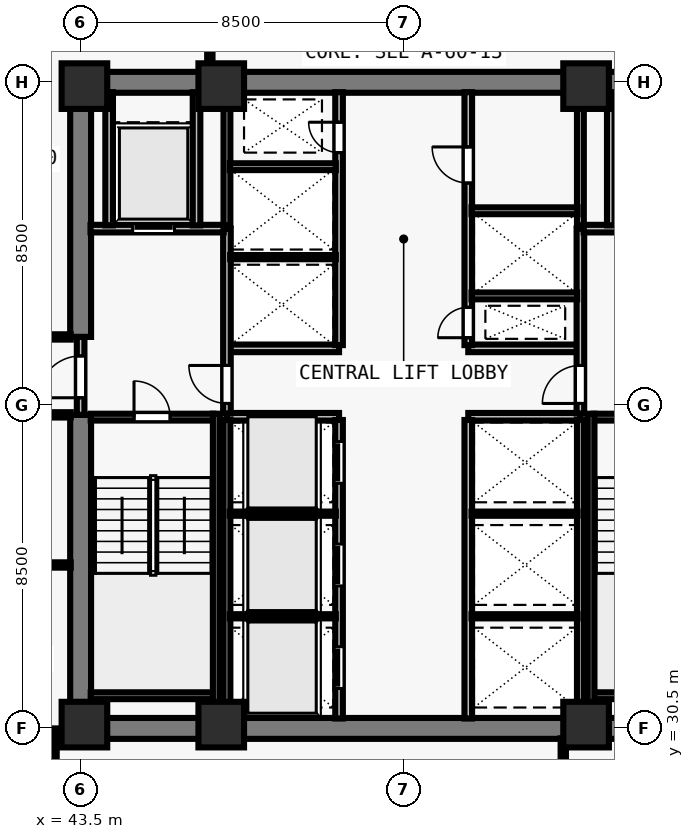
"""IFC4 building model, lengths in metres.
Left out: names, types, materials, properties, quantities, classifications, styles, units other than length and angle.
Written with IfcOpenShell. Run it as: python <this file> out.ifc"""

import sys

from ifc_helpers import new_model, si_unit, direction, frame, frame_2d, origin, origin_2d, place, context, subcontext, project, spatial, rectangle, extrude, element, fill, save


model = new_model("IFC4")
c1 = context("Model", 3, precision=1e-05, world=origin(), true_north=direction((0.0, 1.0)))
c2 = subcontext(c1, "Body", "Model", "MODEL_VIEW")
j1 = project(units=[si_unit("LENGTHUNIT", "METRE"), si_unit("PLANEANGLEUNIT", "RADIAN")], contexts=[c1])
p1 = place(None, origin())
s1 = spatial("IfcSite", under=j1, at=p1, CompositionType="ELEMENT")
p2 = place(p1, origin())
s2 = spatial("IfcBuilding", under=s1, at=p2, CompositionType="ELEMENT")
p3 = place(p2, frame((0.0, 0.0, 41.0)))
s3 = spatial("IfcBuildingStorey", under=s2, at=p3, CompositionType="ELEMENT", Elevation=41.0)
for number, where, z_axis, x_axis in (
    (1, (43.6, 30.6, 0.0), (0.0, 0.0, 1.0), (1.0, 0.0, 0.0)),
    (2, (47.2, 30.6, 0.0), (0.0, 0.0, 1.0), (1.0, 0.0, 0.0)),
    (3, (56.8, 30.6, 0.0), (0.0, 0.0, 1.0), (1.0, 0.0, 0.0)),
    (4, (43.6, 47.4, 0.0), (0.0, 0.0, 1.0), (1.0, 0.0, 0.0)),
    (5, (47.2, 47.4, 0.0), (0.0, 0.0, 1.0), (1.0, 0.0, 0.0)),
    (6, (56.8, 47.4, 0.0), (0.0, 0.0, 1.0), (1.0, 0.0, 0.0)),
):
    element("IfcColumn", number, at=place(p3, frame(where, z_axis=z_axis, x_axis=x_axis)), inside=s3, PredefinedType="COLUMN", context=c2, shape_type="SweptSolid", body=[
        extrude(rectangle(XDim=1.2, YDim=1.2, at=origin_2d()), origin(), (0.0, 0.0, 1.0), 3.5),
    ])
for number, where, z_axis, x_axis in (
    (7, (43.225, 30.5, 0.0), (0.0, 0.0, 1.0), (1.0, 0.0, 0.0)),
    (8, (43.225, 47.5, 0.0), (0.0, 0.0, 1.0), (1.0, 0.0, 0.0)),
):
    element("IfcWall", number, at=place(p3, frame(where, z_axis=z_axis, x_axis=x_axis)), inside=s3, PredefinedType="SHEAR", context=c2, shape_type="SweptSolid", body=[
        extrude(rectangle(XDim=17.55, YDim=0.55, at=frame_2d((8.775, 0.0))), origin(), (0.0, 0.0, 1.0), 3.28),
    ])
p4 = place(p3, frame((43.5, 30.765, 0.0), z_axis=(0.0, 0.0, 1.0), x_axis=(0.0, 1.0, 0.0)))
e9 = element("IfcWall", 9, at=p4, inside=s3, PredefinedType="SHEAR", context=c2, shape_type="SweptSolid", body=[
    extrude(rectangle(XDim=7.985, YDim=0.55, at=frame_2d((3.993, 0.0))), origin(), (0.0, 0.0, 1.0), 3.28),
])
p5 = place(p3, frame((43.5, 40.8, 0.0), z_axis=(0.0, 0.0, 1.0), x_axis=(0.0, 1.0, 0.0)))
e10 = element("IfcWall", 10, at=p5, inside=s3, PredefinedType="SHEAR", context=c2, shape_type="SweptSolid", body=[
    extrude(rectangle(XDim=6.435, YDim=0.55, at=frame_2d((3.218, 0.0))), origin(), (0.0, 0.0, 1.0), 3.28),
])
for number, where, z_axis, x_axis in (
    (11, (47.35, 38.7, 0.0), (0.0, 0.0, 1.0), (1.0, 0.0, 0.0)),
    (12, (47.35, 40.5, 0.0), (0.0, 0.0, 1.0), (1.0, 0.0, 0.0)),
    (13, (53.7, 38.7, 0.0), (0.0, 0.0, 1.0), (1.0, 0.0, 0.0)),
    (14, (53.7, 40.5, 0.0), (0.0, 0.0, 1.0), (1.0, 0.0, 0.0)),
):
    element("IfcWall", number, at=place(p3, frame(where, z_axis=z_axis, x_axis=x_axis)), inside=s3, PredefinedType="SOLIDWALL", context=c2, shape_type="SweptSolid", body=[
        extrude(rectangle(XDim=2.95, YDim=0.2, at=frame_2d((1.475, 0.0))), origin(), (0.0, 0.0, 1.0), 3.28),
    ])
p6 = place(p3, frame((50.3, 30.76, 0.0), z_axis=(0.0, 0.0, 1.0), x_axis=(0.0, 1.0, 0.0)))
e15 = element("IfcWall", 15, at=p6, inside=s3, PredefinedType="SOLIDWALL", context=c2, shape_type="SweptSolid", body=[
    extrude(rectangle(XDim=7.855, YDim=0.2, at=frame_2d((3.927, 0.0))), origin(), (0.0, 0.0, 1.0), 3.28),
])
p7 = place(p6, frame((0.79, 0.0, 0.0)))
e16 = element("IfcOpeningElement", 16, at=p7, cuts=e15, PredefinedType="OPENING", context=c2, shape_type="SweptSolid", body=[
    extrude(rectangle(XDim=1.1, YDim=2.2, at=frame_2d((0.55, 1.1))), frame((0.0, 0.11, 0.0), z_axis=(0.0, -1.0, 0.0), x_axis=(1.0, 0.0, 0.0)), (0.0, 0.0, 1.0), 0.22),
])
p8 = place(p6, frame((3.49, 0.0, 0.0)))
e17 = element("IfcOpeningElement", 17, at=p8, cuts=e15, PredefinedType="OPENING", context=c2, shape_type="SweptSolid", body=[
    extrude(rectangle(XDim=1.1, YDim=2.2, at=frame_2d((0.55, 1.1))), frame((0.0, 0.11, 0.0), z_axis=(0.0, -1.0, 0.0), x_axis=(1.0, 0.0, 0.0)), (0.0, 0.0, 1.0), 0.22),
])
p9 = place(p6, frame((6.19, 0.0, 0.0)))
e18 = element("IfcOpeningElement", 18, at=p9, cuts=e15, PredefinedType="OPENING", context=c2, shape_type="SweptSolid", body=[
    extrude(rectangle(XDim=1.1, YDim=2.2, at=frame_2d((0.55, 1.1))), frame((0.0, 0.11, 0.0), z_axis=(0.0, -1.0, 0.0), x_axis=(1.0, 0.0, 0.0)), (0.0, 0.0, 1.0), 0.22),
])
p10 = place(p3, frame((53.7, 30.76, 0.0), z_axis=(0.0, 0.0, 1.0), x_axis=(0.0, 1.0, 0.0)))
e19 = element("IfcWall", 19, at=p10, inside=s3, PredefinedType="SOLIDWALL", context=c2, shape_type="SweptSolid", body=[
    extrude(rectangle(XDim=7.855, YDim=0.2, at=frame_2d((3.927, 0.0))), origin(), (0.0, 0.0, 1.0), 3.28),
])
p11 = place(p3, frame((50.3, 40.585, 0.0), z_axis=(0.0, 0.0, 1.0), x_axis=(0.0, 1.0, 0.0)))
e20 = element("IfcWall", 20, at=p11, inside=s3, PredefinedType="SOLIDWALL", context=c2, shape_type="SweptSolid", body=[
    extrude(rectangle(XDim=6.655, YDim=0.2, at=frame_2d((3.328, 0.0))), origin(), (0.0, 0.0, 1.0), 3.28),
])
p12 = place(p11, frame((5.065, 0.0, 0.0)))
e21 = element("IfcOpeningElement", 21, at=p12, cuts=e20, PredefinedType="OPENING", context=c2, shape_type="SweptSolid", body=[
    extrude(rectangle(XDim=0.8, YDim=2.08, at=frame_2d((0.4, 1.04))), frame((0.0, 0.11, 0.0), z_axis=(0.0, -1.0, 0.0), x_axis=(1.0, 0.0, 0.0)), (0.0, 0.0, 1.0), 0.22),
])
p13 = place(p3, frame((53.7, 40.585, 0.0), z_axis=(0.0, 0.0, 1.0), x_axis=(0.0, 1.0, 0.0)))
e22 = element("IfcWall", 22, at=p13, inside=s3, PredefinedType="SOLIDWALL", context=c2, shape_type="SweptSolid", body=[
    extrude(rectangle(XDim=6.655, YDim=0.2, at=frame_2d((3.328, 0.0))), origin(), (0.0, 0.0, 1.0), 3.28),
])
p14 = place(p13, frame((0.195, 0.0, 0.0)))
e23 = element("IfcOpeningElement", 23, at=p14, cuts=e22, PredefinedType="OPENING", context=c2, shape_type="SweptSolid", body=[
    extrude(rectangle(XDim=0.8, YDim=2.08, at=frame_2d((0.4, 1.04))), frame((0.0, 0.11, 0.0), z_axis=(0.0, -1.0, 0.0), x_axis=(1.0, 0.0, 0.0)), (0.0, 0.0, 1.0), 0.22),
])
p15 = place(p13, frame((4.265, 0.0, 0.0)))
e24 = element("IfcOpeningElement", 24, at=p15, cuts=e22, PredefinedType="OPENING", context=c2, shape_type="SweptSolid", body=[
    extrude(rectangle(XDim=0.95, YDim=2.12, at=frame_2d((0.475, 1.06))), frame((0.0, 0.11, 0.0), z_axis=(0.0, -1.0, 0.0), x_axis=(1.0, 0.0, 0.0)), (0.0, 0.0, 1.0), 0.22),
])
p16 = place(p3, frame((43.5, 38.75, 0.0), z_axis=(0.0, 0.0, 1.0), x_axis=(0.0, 1.0, 0.0)))
e25 = element("IfcWall", 25, at=p16, inside=s3, PredefinedType="SOLIDWALL", context=c2, shape_type="SweptSolid", body=[
    extrude(rectangle(XDim=2.05, YDim=0.2, at=frame_2d((1.025, 0.0))), origin(), (0.0, 0.0, 1.0), 3.28),
])
p17 = place(p16, frame((0.45, 0.0, 0.0)))
e26 = element("IfcOpeningElement", 26, at=p17, cuts=e25, PredefinedType="OPENING", context=c2, shape_type="SweptSolid", body=[
    extrude(rectangle(XDim=1.1, YDim=2.15, at=frame_2d((0.55, 1.075))), frame((0.0, 0.11, 0.0), z_axis=(0.0, -1.0, 0.0), x_axis=(1.0, 0.0, 0.0)), (0.0, 0.0, 1.0), 0.22),
])
p18 = place(p3, frame((47.35, 38.785, 0.0), z_axis=(0.0, 0.0, 1.0), x_axis=(0.0, 1.0, 0.0)))
e27 = element("IfcWall", 27, at=p18, inside=s3, PredefinedType="SOLIDWALL", context=c2, shape_type="SweptSolid", body=[
    extrude(rectangle(XDim=4.865, YDim=0.2, at=frame_2d((2.433, 0.0))), origin(), (0.0, 0.0, 1.0), 3.28),
])
p19 = place(p18, frame((0.265, 0.0, 0.0)))
e28 = element("IfcOpeningElement", 28, at=p19, cuts=e27, PredefinedType="OPENING", context=c2, shape_type="SweptSolid", body=[
    extrude(rectangle(XDim=1.0, YDim=2.15, at=frame_2d((0.5, 1.075))), frame((0.0, 0.11, 0.0), z_axis=(0.0, -1.0, 0.0), x_axis=(1.0, 0.0, 0.0)), (0.0, 0.0, 1.0), 0.22),
])
p20 = place(p3, frame((43.76, 43.65, 0.0), z_axis=(0.0, 0.0, 1.0), x_axis=(1.0, 0.0, 0.0)))
e29 = element("IfcWall", 29, at=p20, inside=s3, PredefinedType="SOLIDWALL", context=c2, shape_type="SweptSolid", body=[
    extrude(rectangle(XDim=3.505, YDim=0.2, at=frame_2d((1.752, 0.0))), origin(), (0.0, 0.0, 1.0), 3.28),
])
p21 = place(p20, frame((1.11, 0.0, 0.0)))
e30 = element("IfcOpeningElement", 30, at=p21, cuts=e29, PredefinedType="OPENING", context=c2, shape_type="SweptSolid", body=[
    extrude(rectangle(XDim=1.1, YDim=2.2, at=frame_2d((0.55, 1.1))), frame((0.0, 0.11, 0.0), z_axis=(0.0, -1.0, 0.0), x_axis=(1.0, 0.0, 0.0)), (0.0, 0.0, 1.0), 0.22),
])
for number, where, z_axis, x_axis in (
    (31, (46.55, 43.735, 0.0), (0.0, 0.0, 1.0), (0.0, 1.0, 0.0)),
    (32, (44.25, 43.735, 0.0), (0.0, 0.0, 1.0), (0.0, 1.0, 0.0)),
):
    element("IfcWall", number, at=place(p3, frame(where, z_axis=z_axis, x_axis=x_axis)), inside=s3, PredefinedType="SOLIDWALL", context=c2, shape_type="SweptSolid", body=[
        extrude(rectangle(XDim=3.505, YDim=0.2, at=frame_2d((1.752, 0.0))), origin(), (0.0, 0.0, 1.0), 3.28),
    ])
p22 = place(p3, frame((56.65, 38.785, 0.0), z_axis=(0.0, 0.0, 1.0), x_axis=(0.0, 1.0, 0.0)))
e33 = element("IfcWall", 33, at=p22, inside=s3, PredefinedType="SOLIDWALL", context=c2, shape_type="SweptSolid", body=[
    extrude(rectangle(XDim=4.865, YDim=0.2, at=frame_2d((2.433, 0.0))), origin(), (0.0, 0.0, 1.0), 3.28),
])
p23 = place(p22, frame((0.265, 0.0, 0.0)))
e34 = element("IfcOpeningElement", 34, at=p23, cuts=e33, PredefinedType="OPENING", context=c2, shape_type="SweptSolid", body=[
    extrude(rectangle(XDim=1.0, YDim=2.15, at=frame_2d((0.5, 1.075))), frame((0.0, 0.11, 0.0), z_axis=(0.0, -1.0, 0.0), x_axis=(1.0, 0.0, 0.0)), (0.0, 0.0, 1.0), 0.22),
])
p24 = place(p3, frame((56.735, 43.65, 0.0), z_axis=(0.0, 0.0, 1.0), x_axis=(1.0, 0.0, 0.0)))
e35 = element("IfcWall", 35, at=p24, inside=s3, PredefinedType="SOLIDWALL", context=c2, shape_type="SweptSolid", body=[
    extrude(rectangle(XDim=3.505, YDim=0.2, at=frame_2d((1.752, 0.0))), origin(), (0.0, 0.0, 1.0), 3.28),
])
p25 = place(p24, frame((1.295, 0.0, 0.0)))
e36 = element("IfcOpeningElement", 36, at=p25, cuts=e35, PredefinedType="OPENING", context=c2, shape_type="SweptSolid", body=[
    extrude(rectangle(XDim=1.1, YDim=2.2, at=frame_2d((0.55, 1.1))), frame((0.0, 0.11, 0.0), z_axis=(0.0, -1.0, 0.0), x_axis=(1.0, 0.0, 0.0)), (0.0, 0.0, 1.0), 0.22),
])
p26 = place(p3, frame((57.45, 43.735, 0.0), z_axis=(0.0, 0.0, 1.0), x_axis=(0.0, 1.0, 0.0)))
e37 = element("IfcWall", 37, at=p26, inside=s3, PredefinedType="SOLIDWALL", context=c2, shape_type="SweptSolid", body=[
    extrude(rectangle(XDim=3.505, YDim=0.2, at=frame_2d((1.752, 0.0))), origin(), (0.0, 0.0, 1.0), 3.28),
])
p27 = place(p3, frame((47.35, 30.76, 0.0), z_axis=(0.0, 0.0, 1.0), x_axis=(0.0, 1.0, 0.0)))
e38 = element("IfcWall", 38, at=p27, inside=s3, PredefinedType="SOLIDWALL", context=c2, shape_type="SweptSolid", body=[
    extrude(rectangle(XDim=7.855, YDim=0.18, at=frame_2d((3.927, 0.0))), origin(), (0.0, 0.0, 1.0), 3.28),
])
for number, where, z_axis, x_axis in (
    (39, (47.425, 33.45, 0.0), (0.0, 0.0, 1.0), (1.0, 0.0, 0.0)),
    (40, (47.425, 36.15, 0.0), (0.0, 0.0, 1.0), (1.0, 0.0, 0.0)),
):
    element("IfcWall", number, at=place(p3, frame(where, z_axis=z_axis, x_axis=x_axis)), inside=s3, PredefinedType="PARTITIONING", context=c2, shape_type="SweptSolid", body=[
        extrude(rectangle(XDim=2.79, YDim=0.11, at=frame_2d((1.395, 0.0))), origin(), (0.0, 0.0, 1.0), 3.28),
    ])
p28 = place(p3, frame((56.65, 30.76, 0.0), z_axis=(0.0, 0.0, 1.0), x_axis=(0.0, 1.0, 0.0)))
e41 = element("IfcWall", 41, at=p28, inside=s3, PredefinedType="SOLIDWALL", context=c2, shape_type="SweptSolid", body=[
    extrude(rectangle(XDim=7.855, YDim=0.18, at=frame_2d((3.927, 0.0))), origin(), (0.0, 0.0, 1.0), 3.28),
])
for number, where, z_axis, x_axis in (
    (42, (53.785, 33.45, 0.0), (0.0, 0.0, 1.0), (1.0, 0.0, 0.0)),
    (43, (53.785, 36.15, 0.0), (0.0, 0.0, 1.0), (1.0, 0.0, 0.0)),
):
    element("IfcWall", number, at=place(p3, frame(where, z_axis=z_axis, x_axis=x_axis)), inside=s3, PredefinedType="PARTITIONING", context=c2, shape_type="SweptSolid", body=[
        extrude(rectangle(XDim=2.79, YDim=0.11, at=frame_2d((1.395, 0.0))), origin(), (0.0, 0.0, 1.0), 3.28),
    ])
p29 = place(p3, frame((47.35, 43.735, 0.0), z_axis=(0.0, 0.0, 1.0), x_axis=(0.0, 1.0, 0.0)))
e44 = element("IfcWall", 44, at=p29, inside=s3, PredefinedType="SOLIDWALL", context=c2, shape_type="SweptSolid", body=[
    extrude(rectangle(XDim=3.505, YDim=0.18, at=frame_2d((1.752, 0.0))), origin(), (0.0, 0.0, 1.0), 3.28),
])
p30 = place(p3, frame((47.435, 42.9, 0.0), z_axis=(0.0, 0.0, 1.0), x_axis=(1.0, 0.0, 0.0)))
e45 = element("IfcWall", 45, at=p30, inside=s3, PredefinedType="PARTITIONING", context=c2, shape_type="SweptSolid", body=[
    extrude(rectangle(XDim=2.78, YDim=0.11, at=frame_2d((1.39, 0.0))), origin(), (0.0, 0.0, 1.0), 3.28),
])
p31 = place(p3, frame((47.425, 45.28, 0.0), z_axis=(0.0, 0.0, 1.0), x_axis=(1.0, 0.0, 0.0)))
e46 = element("IfcWall", 46, at=p31, inside=s3, PredefinedType="SOLIDWALL", context=c2, shape_type="SweptSolid", body=[
    extrude(rectangle(XDim=2.79, YDim=0.18, at=frame_2d((1.395, 0.0))), origin(), (0.0, 0.0, 1.0), 3.28),
])
p32 = place(p3, frame((56.65, 43.735, 0.0), z_axis=(0.0, 0.0, 1.0), x_axis=(0.0, 1.0, 0.0)))
e47 = element("IfcWall", 47, at=p32, inside=s3, PredefinedType="SOLIDWALL", context=c2, shape_type="SweptSolid", body=[
    extrude(rectangle(XDim=3.505, YDim=0.18, at=frame_2d((1.752, 0.0))), origin(), (0.0, 0.0, 1.0), 3.28),
])
p33 = place(p3, frame((53.785, 41.88, 0.0), z_axis=(0.0, 0.0, 1.0), x_axis=(1.0, 0.0, 0.0)))
e48 = element("IfcWall", 48, at=p33, inside=s3, PredefinedType="SOLIDWALL", context=c2, shape_type="SweptSolid", body=[
    extrude(rectangle(XDim=2.78, YDim=0.18, at=frame_2d((1.39, 0.0))), origin(), (0.0, 0.0, 1.0), 3.28),
])
p34 = place(p3, frame((53.785, 44.12, 0.0), z_axis=(0.0, 0.0, 1.0), x_axis=(1.0, 0.0, 0.0)))
e49 = element("IfcWall", 49, at=p34, inside=s3, PredefinedType="SOLIDWALL", context=c2, shape_type="SweptSolid", body=[
    extrude(rectangle(XDim=2.79, YDim=0.18, at=frame_2d((1.395, 0.0))), origin(), (0.0, 0.0, 1.0), 3.28),
])
for number, where, z_axis, x_axis in (
    (50, (38.055, 38.75, 0.0), (0.0, 0.0, 1.0), (1.0, 0.0, 0.0)),
    (51, (38.055, 40.8, 0.0), (0.0, 0.0, 1.0), (1.0, 0.0, 0.0)),
):
    element("IfcWall", number, at=place(p3, frame(where, z_axis=z_axis, x_axis=x_axis)), inside=s3, PredefinedType="PARTITIONING", context=c2, shape_type="SweptSolid", body=[
        extrude(rectangle(XDim=5.185, YDim=0.14, at=frame_2d((2.593, 0.0))), origin(), (0.0, 0.0, 1.0), 3.28),
    ])
p35 = place(p3, frame((42.8, 24.605, 0.0), z_axis=(0.0, 0.0, 1.0), x_axis=(0.0, 1.0, 0.0)))
e52 = element("IfcWall", 52, at=p35, inside=s3, PredefinedType="PARTITIONING", context=c2, shape_type="SweptSolid", body=[
    extrude(rectangle(XDim=5.895, YDim=0.14, at=frame_2d((2.948, 0.0))), origin(), (0.0, 0.0, 1.0), 2.439),
])
p36 = place(p3, frame((56.2, 24.605, 0.0), z_axis=(0.0, 0.0, 1.0), x_axis=(0.0, 1.0, 0.0)))
e53 = element("IfcWall", 53, at=p36, inside=s3, PredefinedType="PARTITIONING", context=c2, shape_type="SweptSolid", body=[
    extrude(rectangle(XDim=5.635, YDim=0.14, at=frame_2d((2.817, 0.0))), origin(), (0.0, 0.0, 1.0), 2.849),
])
p37 = place(p3, frame((46.9, 47.76, 0.0), z_axis=(0.0, 0.0, 1.0), x_axis=(0.0, 1.0, 0.0)))
e54 = element("IfcWall", 54, at=p37, inside=s3, PredefinedType="PARTITIONING", context=c2, shape_type="SweptSolid", body=[
    extrude(rectangle(XDim=5.635, YDim=0.14, at=frame_2d((2.817, 0.0))), origin(), (0.0, 0.0, 1.0), 3.28),
])
p38 = place(p3, frame((38.055, 34.8, 0.0), z_axis=(0.0, 0.0, 1.0), x_axis=(1.0, 0.0, 0.0)))
e55 = element("IfcWall", 55, at=p38, inside=s3, PredefinedType="PARTITIONING", context=c2, shape_type="SweptSolid", body=[
    extrude(rectangle(XDim=5.185, YDim=0.14, at=frame_2d((2.593, 0.0))), origin(), (0.0, 0.0, 1.0), 3.28),
])
p39 = place(p3, frame((43.765, 38.69, 0.0), z_axis=(0.0, 0.0, 1.0), x_axis=(1.0, 0.0, 0.0)))
e56 = element("IfcWall", 56, at=p39, inside=s3, PredefinedType="SOLIDWALL", context=c2, shape_type="SweptSolid", body=[
    extrude(rectangle(XDim=3.23, YDim=0.18, at=frame_2d((1.615, 0.0))), origin(), (0.0, 0.0, 1.0), 3.28),
])
p40 = place(p39, frame((1.14, 0.0, 0.0)))
e57 = element("IfcOpeningElement", 57, at=p40, cuts=e56, PredefinedType="OPENING", context=c2, shape_type="SweptSolid", body=[
    extrude(rectangle(XDim=0.95, YDim=2.15, at=frame_2d((0.475, 1.075))), frame((0.0, 0.1, 0.0), z_axis=(0.0, -1.0, 0.0), x_axis=(1.0, 0.0, 0.0)), (0.0, 0.0, 1.0), 0.2),
])
p41 = place(p3, frame((43.765, 31.36, 0.0), z_axis=(0.0, 0.0, 1.0), x_axis=(1.0, 0.0, 0.0)))
e58 = element("IfcWall", 58, at=p41, inside=s3, PredefinedType="SOLIDWALL", context=c2, shape_type="SweptSolid", body=[
    extrude(rectangle(XDim=3.23, YDim=0.18, at=frame_2d((1.615, 0.0))), origin(), (0.0, 0.0, 1.0), 3.28),
])
p42 = place(p3, frame((47.07, 38.78, 0.0), z_axis=(0.0, 0.0, 1.0), x_axis=(0.0, -1.0, 0.0)))
e59 = element("IfcWall", 59, at=p42, inside=s3, PredefinedType="SOLIDWALL", context=c2, shape_type="SweptSolid", body=[
    extrude(rectangle(XDim=8.017, YDim=0.18, at=frame_2d((4.009, 0.0))), origin(), (0.0, 0.0, 1.0), 3.28),
])
p43 = place(p3, frame((57.005, 38.69, 0.0), z_axis=(0.0, 0.0, 1.0), x_axis=(1.0, 0.0, 0.0)))
e60 = element("IfcWall", 60, at=p43, inside=s3, PredefinedType="SOLIDWALL", context=c2, shape_type="SweptSolid", body=[
    extrude(rectangle(XDim=3.23, YDim=0.18, at=frame_2d((1.615, 0.0))), origin(), (0.0, 0.0, 1.0), 3.28),
])
p44 = place(p43, frame((1.14, 0.0, 0.0)))
e61 = element("IfcOpeningElement", 61, at=p44, cuts=e60, PredefinedType="OPENING", context=c2, shape_type="SweptSolid", body=[
    extrude(rectangle(XDim=0.95, YDim=2.15, at=frame_2d((0.475, 1.075))), frame((0.0, 0.1, 0.0), z_axis=(0.0, -1.0, 0.0), x_axis=(1.0, 0.0, 0.0)), (0.0, 0.0, 1.0), 0.2),
])
p45 = place(p3, frame((57.005, 31.36, 0.0), z_axis=(0.0, 0.0, 1.0), x_axis=(1.0, 0.0, 0.0)))
e62 = element("IfcWall", 62, at=p45, inside=s3, PredefinedType="SOLIDWALL", context=c2, shape_type="SweptSolid", body=[
    extrude(rectangle(XDim=3.23, YDim=0.18, at=frame_2d((1.615, 0.0))), origin(), (0.0, 0.0, 1.0), 3.28),
])
p46 = place(p3, frame((56.93, 38.78, 0.0), z_axis=(0.0, 0.0, 1.0), x_axis=(0.0, -1.0, 0.0)))
e63 = element("IfcWall", 63, at=p46, inside=s3, PredefinedType="SOLIDWALL", context=c2, shape_type="SweptSolid", body=[
    extrude(rectangle(XDim=8.017, YDim=0.18, at=frame_2d((4.009, 0.0))), origin(), (0.0, 0.0, 1.0), 3.28),
])
p47 = place(p17, origin())
e64 = element("IfcDoor", 64, at=p47, inside=s3, OperationType="SINGLE_SWING_LEFT", PredefinedType="DOOR", context=c2, shape_type="SweptSolid", body=[
    extrude(rectangle(XDim=1.1, YDim=2.15, at=frame_2d((0.55, 1.075))), frame((0.0, 0.025, 0.0), z_axis=(0.0, -1.0, 0.0), x_axis=(1.0, 0.0, 0.0)), (0.0, 0.0, 1.0), 0.05),
])
fill(e26, e64)
p48 = place(p19, origin())
e65 = element("IfcDoor", 65, at=p48, inside=s3, OperationType="SINGLE_SWING_RIGHT", PredefinedType="DOOR", context=c2, shape_type="SweptSolid", body=[
    extrude(rectangle(XDim=1.0, YDim=2.15, at=frame_2d((0.5, 1.075))), frame((0.0, 0.025, 0.0), z_axis=(0.0, -1.0, 0.0), x_axis=(1.0, 0.0, 0.0)), (0.0, 0.0, 1.0), 0.05),
])
fill(e28, e65)
p49 = place(p21, origin())
e66 = element("IfcDoor", 66, at=p49, inside=s3, OperationType="SLIDING_TO_LEFT", PredefinedType="DOOR", context=c2, shape_type="SweptSolid", body=[
    extrude(rectangle(XDim=1.1, YDim=2.2, at=frame_2d((0.55, 1.1))), frame((0.0, 0.025, 0.0), z_axis=(0.0, -1.0, 0.0), x_axis=(1.0, 0.0, 0.0)), (0.0, 0.0, 1.0), 0.05),
])
fill(e30, e66)
p50 = place(p23, origin())
e67 = element("IfcDoor", 67, at=p50, inside=s3, OperationType="SINGLE_SWING_LEFT", PredefinedType="DOOR", context=c2, shape_type="SweptSolid", body=[
    extrude(rectangle(XDim=1.0, YDim=2.15, at=frame_2d((0.5, 1.075))), frame((0.0, 0.025, 0.0), z_axis=(0.0, -1.0, 0.0), x_axis=(1.0, 0.0, 0.0)), (0.0, 0.0, 1.0), 0.05),
])
fill(e34, e67)
p51 = place(p7, origin())
e68 = element("IfcDoor", 68, at=p51, inside=s3, OperationType="SLIDING_TO_LEFT", PredefinedType="DOOR", context=c2, shape_type="SweptSolid", body=[
    extrude(rectangle(XDim=1.1, YDim=2.2, at=frame_2d((0.55, 1.1))), frame((0.0, 0.025, 0.0), z_axis=(0.0, -1.0, 0.0), x_axis=(1.0, 0.0, 0.0)), (0.0, 0.0, 1.0), 0.05),
])
fill(e16, e68)
p52 = place(p8, origin())
e69 = element("IfcDoor", 69, at=p52, inside=s3, OperationType="SLIDING_TO_LEFT", PredefinedType="DOOR", context=c2, shape_type="SweptSolid", body=[
    extrude(rectangle(XDim=1.1, YDim=2.2, at=frame_2d((0.55, 1.1))), frame((0.0, 0.025, 0.0), z_axis=(0.0, -1.0, 0.0), x_axis=(1.0, 0.0, 0.0)), (0.0, 0.0, 1.0), 0.05),
])
fill(e17, e69)
p53 = place(p9, origin())
e70 = element("IfcDoor", 70, at=p53, inside=s3, OperationType="SLIDING_TO_LEFT", PredefinedType="DOOR", context=c2, shape_type="SweptSolid", body=[
    extrude(rectangle(XDim=1.1, YDim=2.2, at=frame_2d((0.55, 1.1))), frame((0.0, 0.025, 0.0), z_axis=(0.0, -1.0, 0.0), x_axis=(1.0, 0.0, 0.0)), (0.0, 0.0, 1.0), 0.05),
])
fill(e18, e70)
p54 = place(p12, origin())
e71 = element("IfcDoor", 71, at=p54, inside=s3, OperationType="SINGLE_SWING_RIGHT", PredefinedType="DOOR", context=c2, shape_type="SweptSolid", body=[
    extrude(rectangle(XDim=0.8, YDim=2.08, at=frame_2d((0.4, 1.04))), frame((0.0, 0.025, 0.0), z_axis=(0.0, -1.0, 0.0), x_axis=(1.0, 0.0, 0.0)), (0.0, 0.0, 1.0), 0.05),
])
fill(e21, e71)
p55 = place(p14, origin())
e72 = element("IfcDoor", 72, at=p55, inside=s3, OperationType="SINGLE_SWING_LEFT", PredefinedType="DOOR", context=c2, shape_type="SweptSolid", body=[
    extrude(rectangle(XDim=0.8, YDim=2.08, at=frame_2d((0.4, 1.04))), frame((0.0, 0.025, 0.0), z_axis=(0.0, -1.0, 0.0), x_axis=(1.0, 0.0, 0.0)), (0.0, 0.0, 1.0), 0.05),
])
fill(e23, e72)
p56 = place(p15, origin())
e73 = element("IfcDoor", 73, at=p56, inside=s3, OperationType="SINGLE_SWING_RIGHT", PredefinedType="DOOR", context=c2, shape_type="SweptSolid", body=[
    extrude(rectangle(XDim=0.95, YDim=2.12, at=frame_2d((0.475, 1.06))), frame((0.0, 0.025, 0.0), z_axis=(0.0, -1.0, 0.0), x_axis=(1.0, 0.0, 0.0)), (0.0, 0.0, 1.0), 0.05),
])
fill(e24, e73)
p57 = place(p40, origin())
e74 = element("IfcDoor", 74, at=p57, inside=s3, OperationType="SINGLE_SWING_LEFT", PredefinedType="DOOR", context=c2, shape_type="SweptSolid", body=[
    extrude(rectangle(XDim=0.95, YDim=2.15, at=frame_2d((0.475, 1.075))), frame((0.0, 0.025, 0.0), z_axis=(0.0, -1.0, 0.0), x_axis=(1.0, 0.0, 0.0)), (0.0, 0.0, 1.0), 0.05),
])
fill(e57, e74)
save(model, sys.argv[1])
